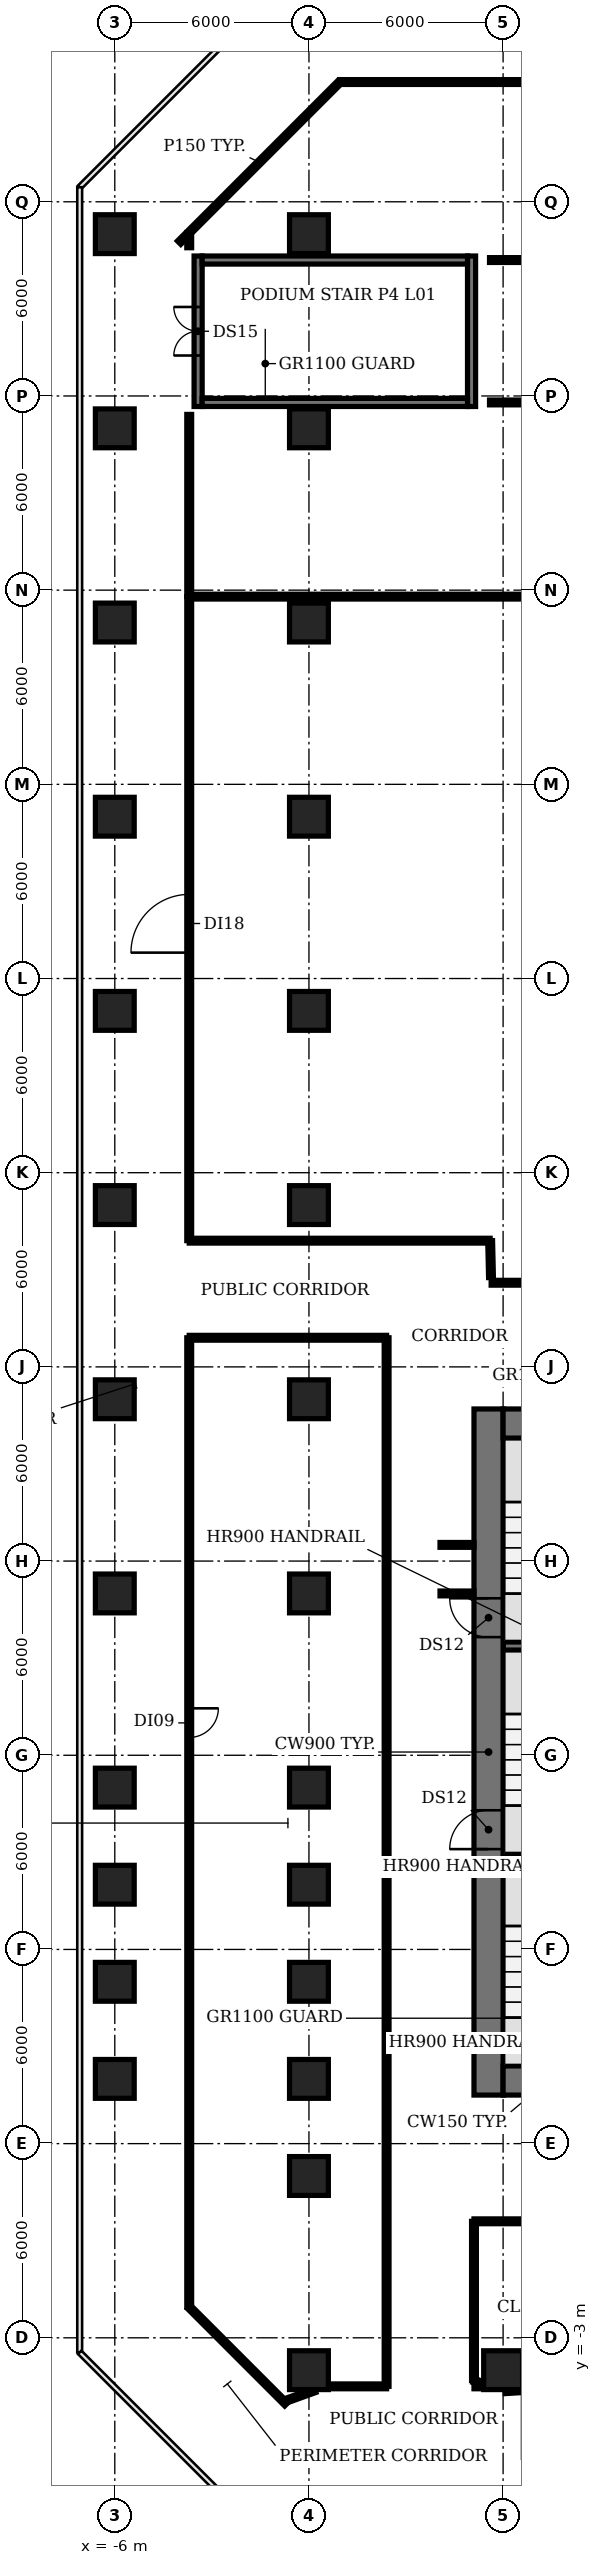
"""IFC4 building model, lengths in metres.
Left out: names, types, materials, properties, quantities, classifications, styles, units other than length and angle.
Written with IfcOpenShell. Run it as: python <this file> out.ifc"""

import sys

from ifc_helpers import new_model, si_unit, direction, frame, frame_2d, origin, origin_2d, place, context, subcontext, project, spatial, rectangle, extrude, element, fill, save


model = new_model("IFC4")
c1 = context("Model", 3, precision=1e-05, world=origin(), true_north=direction((0.0, 1.0)))
c2 = subcontext(c1, "Body", "Model", "MODEL_VIEW")
j1 = project(units=[si_unit("LENGTHUNIT", "METRE"), si_unit("PLANEANGLEUNIT", "RADIAN")], contexts=[c1])
p1 = place(None, origin())
s1 = spatial("IfcSite", under=j1, at=p1, CompositionType="ELEMENT")
p2 = place(p1, origin())
s2 = spatial("IfcBuilding", under=s1, at=p2, CompositionType="ELEMENT")
p3 = place(p2, frame((0.0, 0.0, 6.0)))
s3 = spatial("IfcBuildingStorey", under=s2, at=p3, CompositionType="ELEMENT", Elevation=6.0)
for number, where, z_axis, x_axis in (
    (1, (-6.0, 5.0, 0.0), (0.0, 0.0, 1.0), (1.0, 0.0, 0.0)),
    (2, (-6.0, 8.0, 0.0), (0.0, 0.0, 1.0), (1.0, 0.0, 0.0)),
    (3, (-6.0, 11.0, 0.0), (0.0, 0.0, 1.0), (1.0, 0.0, 0.0)),
    (4, (-6.0, 14.0, 0.0), (0.0, 0.0, 1.0), (1.0, 0.0, 0.0)),
    (5, (-6.0, 20.0, 0.0), (0.0, 0.0, 1.0), (1.0, 0.0, 0.0)),
    (6, (-6.0, 26.0, 0.0), (0.0, 0.0, 1.0), (1.0, 0.0, 0.0)),
    (7, (-6.0, 32.0, 0.0), (0.0, 0.0, 1.0), (1.0, 0.0, 0.0)),
    (8, (-6.0, 38.0, 0.0), (0.0, 0.0, 1.0), (1.0, 0.0, 0.0)),
    (9, (-6.0, 44.0, 0.0), (0.0, 0.0, 1.0), (1.0, 0.0, 0.0)),
    (10, (-6.0, 50.0, 0.0), (0.0, 0.0, 1.0), (1.0, 0.0, 0.0)),
    (11, (-6.0, 56.0, 0.0), (0.0, 0.0, 1.0), (1.0, 0.0, 0.0)),
    (12, (-6.0, 62.0, 0.0), (0.0, 0.0, 1.0), (1.0, 0.0, 0.0)),
    (13, (0.0, -4.0, 0.0), (0.0, 0.0, 1.0), (1.0, 0.0, 0.0)),
    (14, (0.0, 2.0, 0.0), (0.0, 0.0, 1.0), (1.0, 0.0, 0.0)),
    (15, (0.0, 5.0, 0.0), (0.0, 0.0, 1.0), (1.0, 0.0, 0.0)),
    (16, (0.0, 8.0, 0.0), (0.0, 0.0, 1.0), (1.0, 0.0, 0.0)),
    (17, (0.0, 11.0, 0.0), (0.0, 0.0, 1.0), (1.0, 0.0, 0.0)),
    (18, (0.0, 14.0, 0.0), (0.0, 0.0, 1.0), (1.0, 0.0, 0.0)),
    (19, (0.0, 20.0, 0.0), (0.0, 0.0, 1.0), (1.0, 0.0, 0.0)),
    (20, (0.0, 26.0, 0.0), (0.0, 0.0, 1.0), (1.0, 0.0, 0.0)),
    (21, (0.0, 32.0, 0.0), (0.0, 0.0, 1.0), (1.0, 0.0, 0.0)),
    (22, (0.0, 38.0, 0.0), (0.0, 0.0, 1.0), (1.0, 0.0, 0.0)),
    (23, (0.0, 44.0, 0.0), (0.0, 0.0, 1.0), (1.0, 0.0, 0.0)),
    (24, (0.0, 50.0, 0.0), (0.0, 0.0, 1.0), (1.0, 0.0, 0.0)),
    (25, (0.0, 56.0, 0.0), (0.0, 0.0, 1.0), (1.0, 0.0, 0.0)),
    (26, (0.0, 62.0, 0.0), (0.0, 0.0, 1.0), (1.0, 0.0, 0.0)),
    (27, (6.0, -4.0, 0.0), (0.0, 0.0, 1.0), (1.0, 0.0, 0.0)),
):
    element("IfcColumn", number, at=place(p3, frame(where, z_axis=z_axis, x_axis=x_axis)), inside=s3, PredefinedType="COLUMN", context=c2, shape_type="SweptSolid", body=[
        extrude(rectangle(XDim=1.2, YDim=1.2, at=origin_2d()), origin(), (0.0, 0.0, 1.0), 4.6),
    ])
for number, where, z_axis, x_axis in (
    (28, (6.0, 11.825, 0.0), (0.0, 0.0, 1.0), (1.0, 0.0, 0.0)),
    (29, (6.0, 18.375, 0.0), (0.0, 0.0, 1.0), (1.0, 0.0, 0.0)),
):
    element("IfcWall", number, at=place(p3, frame(where, z_axis=z_axis, x_axis=x_axis)), inside=s3, PredefinedType="SHEAR", context=c2, shape_type="SweptSolid", body=[
        extrude(rectangle(XDim=3.15, YDim=0.25, at=frame_2d((1.575, 0.0))), origin(), (0.0, 0.0, 1.0), 4.6),
    ])
p4 = place(p3, frame((5.55, 4.5, 0.0), z_axis=(0.0, 0.0, 1.0), x_axis=(0.0, 1.0, 0.0)))
e30 = element("IfcWall", 30, at=p4, inside=s3, PredefinedType="SHEAR", context=c2, shape_type="SweptSolid", body=[
    extrude(rectangle(XDim=21.2, YDim=0.9, at=frame_2d((10.6, 0.0))), origin(), (0.0, 0.0, 1.0), 4.6),
])
p5 = place(p4, frame((7.6, 0.0, 0.0)))
e31 = element("IfcOpeningElement", 31, at=p5, cuts=e30, PredefinedType="OPENING", context=c2, shape_type="SweptSolid", body=[
    extrude(rectangle(XDim=1.2, YDim=2.1, at=frame_2d((0.6, 1.05))), frame((0.0, 0.46, 0.0), z_axis=(0.0, -1.0, 0.0), x_axis=(1.0, 0.0, 0.0)), (0.0, 0.0, 1.0), 0.92),
])
p6 = place(p4, frame((14.15, 0.0, 0.0)))
e32 = element("IfcOpeningElement", 32, at=p6, cuts=e30, PredefinedType="OPENING", context=c2, shape_type="SweptSolid", body=[
    extrude(rectangle(XDim=1.2, YDim=2.1, at=frame_2d((0.6, 1.05))), frame((0.0, 0.46, 0.0), z_axis=(0.0, -1.0, 0.0), x_axis=(1.0, 0.0, 0.0)), (0.0, 0.0, 1.0), 0.92),
])
p7 = place(p3, frame((24.0, 4.95, 0.0), z_axis=(0.0, 0.0, 1.0), x_axis=(-1.0, 0.0, 0.0)))
e33 = element("IfcWall", 33, at=p7, inside=s3, PredefinedType="SHEAR", context=c2, shape_type="SweptSolid", body=[
    extrude(rectangle(XDim=18.0, YDim=0.9, at=frame_2d((9.0, 0.0))), origin(), (0.0, 0.0, 1.0), 4.6),
])
p8 = place(p7, frame((15.675, 0.0, 0.0)))
e34 = element("IfcOpeningElement", 34, at=p8, cuts=e33, PredefinedType="OPENING", context=c2, shape_type="SweptSolid", body=[
    extrude(rectangle(XDim=1.5, YDim=2.1, at=frame_2d((0.75, 1.05))), frame((0.0, 0.46, 0.0), z_axis=(0.0, -1.0, 0.0), x_axis=(1.0, 0.0, 0.0)), (0.0, 0.0, 1.0), 0.92),
])
p9 = place(p7, frame((0.825, 0.0, 0.0)))
e35 = element("IfcOpeningElement", 35, at=p9, cuts=e33, PredefinedType="OPENING", context=c2, shape_type="SweptSolid", body=[
    extrude(rectangle(XDim=1.5, YDim=2.1, at=frame_2d((0.75, 1.05))), frame((0.0, 0.46, 0.0), z_axis=(0.0, -1.0, 0.0), x_axis=(1.0, 0.0, 0.0)), (0.0, 0.0, 1.0), 0.92),
])
p10 = place(p7, frame((13.0, 0.0, 0.0)))
e36 = element("IfcOpeningElement", 36, at=p10, cuts=e33, PredefinedType="OPENING", context=c2, shape_type="SweptSolid", body=[
    extrude(rectangle(XDim=1.2, YDim=2.1, at=frame_2d((0.6, 1.05))), frame((0.0, 0.46, 0.0), z_axis=(0.0, -1.0, 0.0), x_axis=(1.0, 0.0, 0.0)), (0.0, 0.0, 1.0), 0.92),
])
p11 = place(p7, frame((4.9, 0.0, 0.0)))
e37 = element("IfcOpeningElement", 37, at=p11, cuts=e33, PredefinedType="OPENING", context=c2, shape_type="SweptSolid", body=[
    extrude(rectangle(XDim=1.0, YDim=2.1, at=frame_2d((0.5, 1.05))), frame((0.0, 0.46, 0.0), z_axis=(0.0, -1.0, 0.0), x_axis=(1.0, 0.0, 0.0)), (0.0, 0.0, 1.0), 0.92),
])
p12 = place(p3, frame((6.0, 25.25, 0.0), z_axis=(0.0, 0.0, 1.0), x_axis=(1.0, 0.0, 0.0)))
e38 = element("IfcWall", 38, at=p12, inside=s3, PredefinedType="SHEAR", context=c2, shape_type="SweptSolid", body=[
    extrude(rectangle(XDim=18.0, YDim=0.9, at=frame_2d((9.0, 0.0))), origin(), (0.0, 0.0, 1.0), 4.6),
])
p13 = place(p3, frame((-3.425, 56.675, 0.0), z_axis=(0.0, 0.0, 1.0), x_axis=(0.0, 1.0, 0.0)))
e39 = element("IfcWall", 39, at=p13, inside=s3, PredefinedType="SHEAR", context=c2, shape_type="SweptSolid", body=[
    extrude(rectangle(XDim=4.65, YDim=0.25, at=frame_2d((2.325, 0.0))), origin(), (0.0, 0.0, 1.0), 4.6),
])
p14 = place(p13, frame((1.575, 0.0, 0.0)))
e40 = element("IfcOpeningElement", 40, at=p14, cuts=e39, PredefinedType="OPENING", context=c2, shape_type="SweptSolid", body=[
    extrude(rectangle(XDim=1.5, YDim=2.1, at=frame_2d((0.75, 1.05))), frame((0.0, 0.135, 0.0), z_axis=(0.0, -1.0, 0.0), x_axis=(1.0, 0.0, 0.0)), (0.0, 0.0, 1.0), 0.27),
])
p15 = place(p3, frame((5.025, 56.675, 0.0), z_axis=(0.0, 0.0, 1.0), x_axis=(0.0, 1.0, 0.0)))
e41 = element("IfcWall", 41, at=p15, inside=s3, PredefinedType="SHEAR", context=c2, shape_type="SweptSolid", body=[
    extrude(rectangle(XDim=4.65, YDim=0.25, at=frame_2d((2.325, 0.0))), origin(), (0.0, 0.0, 1.0), 4.6),
])
for number, where, z_axis, x_axis in (
    (42, (-3.3, 56.8, 0.0), (0.0, 0.0, 1.0), (1.0, 0.0, 0.0)),
    (43, (-3.3, 61.2, 0.0), (0.0, 0.0, 1.0), (1.0, 0.0, 0.0)),
):
    element("IfcWall", number, at=place(p3, frame(where, z_axis=z_axis, x_axis=x_axis)), inside=s3, PredefinedType="SHEAR", context=c2, shape_type="SweptSolid", body=[
        extrude(rectangle(XDim=8.2, YDim=0.25, at=frame_2d((4.1, 0.0))), origin(), (0.0, 0.0, 1.0), 4.6),
    ])
p16 = place(p3, frame((-4.013, 61.737, 0.0), z_axis=(0.0, 0.0, 1.0), x_axis=(0.707106781187, 0.707106781187, 0.0)))
e44 = element("IfcWall", 44, at=p16, inside=s3, PredefinedType="PARTITIONING", context=c2, shape_type="SweptSolid", body=[
    extrude(rectangle(XDim=7.019, YDim=0.15, at=frame_2d((3.51, 0.0))), origin(), (0.0, 0.0, 1.0), 3.18),
])
p17 = place(p3, frame((-3.7, -2.05, 0.0), z_axis=(0.0, 0.0, 1.0), x_axis=(0.707106781187, -0.707106781187, 0.0)))
e45 = element("IfcWall", 45, at=p17, inside=s3, PredefinedType="PARTITIONING", context=c2, shape_type="SweptSolid", body=[
    extrude(rectangle(XDim=4.249, YDim=0.15, at=frame_2d((2.125, 0.0))), origin(), (0.0, 0.0, 1.0), 3.18),
])
p18 = place(p3, frame((-3.7, 27.9, 0.0), z_axis=(0.0, 0.0, 1.0), x_axis=(0.0, -1.0, 0.0)))
e46 = element("IfcWall", 46, at=p18, inside=s3, PredefinedType="PARTITIONING", context=c2, shape_type="SweptSolid", body=[
    extrude(rectangle(XDim=29.95, YDim=0.15, at=frame_2d((14.975, 0.0))), origin(), (0.0, 0.0, 1.0), 3.18),
])
p19 = place(p18, frame((11.45, 0.0, 0.0)))
e47 = element("IfcOpeningElement", 47, at=p19, cuts=e46, PredefinedType="OPENING", context=c2, shape_type="SweptSolid", body=[
    extrude(rectangle(XDim=0.9, YDim=2.1, at=frame_2d((0.45, 1.05))), frame((0.0, 0.085, 0.0), z_axis=(0.0, -1.0, 0.0), x_axis=(1.0, 0.0, 0.0)), (0.0, 0.0, 1.0), 0.17),
])
p20 = place(p3, frame((-3.7, 27.9, 0.0), z_axis=(0.0, 0.0, 1.0), x_axis=(1.0, 0.0, 0.0)))
e48 = element("IfcWall", 48, at=p20, inside=s3, PredefinedType="PARTITIONING", context=c2, shape_type="SweptSolid", body=[
    extrude(rectangle(XDim=6.1, YDim=0.15, at=frame_2d((3.05, 0.0))), origin(), (0.0, 0.0, 1.0), 3.18),
])
p21 = place(p3, frame((-3.7, 30.9, 0.0), z_axis=(0.0, 0.0, 1.0), x_axis=(0.0, 1.0, 0.0)))
e49 = element("IfcWall", 49, at=p21, inside=s3, PredefinedType="PARTITIONING", context=c2, shape_type="SweptSolid", body=[
    extrude(rectangle(XDim=19.9, YDim=0.15, at=frame_2d((9.95, 0.0))), origin(), (0.0, 0.0, 1.0), 3.18),
])
p22 = place(p21, frame((8.9, 0.0, 0.0)))
e50 = element("IfcOpeningElement", 50, at=p22, cuts=e49, PredefinedType="OPENING", context=c2, shape_type="SweptSolid", body=[
    extrude(rectangle(XDim=1.8, YDim=2.1, at=frame_2d((0.9, 1.05))), frame((0.0, 0.085, 0.0), z_axis=(0.0, -1.0, 0.0), x_axis=(1.0, 0.0, 0.0)), (0.0, 0.0, 1.0), 0.17),
])
p23 = place(p3, frame((-3.7, 30.9, 0.0), z_axis=(0.0, 0.0, 1.0), x_axis=(1.0, 0.0, 0.0)))
e51 = element("IfcWall", 51, at=p23, inside=s3, PredefinedType="PARTITIONING", context=c2, shape_type="SweptSolid", body=[
    extrude(rectangle(XDim=9.3, YDim=0.15, at=frame_2d((4.65, 0.0))), origin(), (0.0, 0.0, 1.0), 3.18),
])
p24 = place(p3, frame((-3.7, 50.8, 0.0), z_axis=(0.0, 0.0, 1.0), x_axis=(0.0, 1.0, 0.0)))
e52 = element("IfcWall", 52, at=p24, inside=s3, PredefinedType="PARTITIONING", context=c2, shape_type="SweptSolid", body=[
    extrude(rectangle(XDim=5.63, YDim=0.15, at=frame_2d((2.815, 0.0))), origin(), (0.0, 0.0, 1.0), 3.18),
])
p25 = place(p3, frame((-3.7, 50.8, 0.0), z_axis=(0.0, 0.0, 1.0), x_axis=(1.0, 0.0, 0.0)))
e53 = element("IfcWall", 53, at=p25, inside=s3, PredefinedType="PARTITIONING", context=c2, shape_type="SweptSolid", body=[
    extrude(rectangle(XDim=32.2, YDim=0.15, at=frame_2d((16.1, 0.0))), origin(), (0.0, 0.0, 1.0), 3.18),
])
p26 = place(p3, frame((-3.7, 61.58, 0.0), z_axis=(0.0, 0.0, 1.0), x_axis=(0.0, 1.0, 0.0)))
e54 = element("IfcWall", 54, at=p26, inside=s3, PredefinedType="PARTITIONING", context=c2, shape_type="SweptSolid", body=[
    extrude(rectangle(XDim=0.47, YDim=0.15, at=frame_2d((0.235, 0.0))), origin(), (0.0, 0.0, 1.0), 3.18),
])
p27 = place(p3, frame((-0.78, -4.97, 0.0), z_axis=(0.0, 0.0, 1.0), x_axis=(0.940681994894, 0.339289528991, 0.0)))
e55 = element("IfcWall", 55, at=p27, inside=s3, PredefinedType="PARTITIONING", context=c2, shape_type="SweptSolid", body=[
    extrude(rectangle(XDim=1.031, YDim=0.15, at=frame_2d((0.516, 0.0))), origin(), (0.0, 0.0, 1.0), 3.18),
])
p28 = place(p3, frame((0.46, -4.5, 0.0), z_axis=(0.0, 0.0, 1.0), x_axis=(1.0, 0.0, 0.0)))
e56 = element("IfcWall", 56, at=p28, inside=s3, PredefinedType="PARTITIONING", context=c2, shape_type="SweptSolid", body=[
    extrude(rectangle(XDim=1.94, YDim=0.15, at=frame_2d((0.97, 0.0))), origin(), (0.0, 0.0, 1.0), 3.18),
])
p29 = place(p3, frame((2.4, -4.5, 0.0), z_axis=(0.0, 0.0, 1.0), x_axis=(0.0, 1.0, 0.0)))
e57 = element("IfcWall", 57, at=p29, inside=s3, PredefinedType="PARTITIONING", context=c2, shape_type="SweptSolid", body=[
    extrude(rectangle(XDim=32.4, YDim=0.15, at=frame_2d((16.2, 0.0))), origin(), (0.0, 0.0, 1.0), 3.18),
])
for number, where, z_axis, x_axis in (
    (58, (4.05, 20.0, 0.0), (0.0, 0.0, 1.0), (1.0, 0.0, 0.0)),
    (59, (4.05, 21.5, 0.0), (0.0, 0.0, 1.0), (1.0, 0.0, 0.0)),
):
    element("IfcWall", number, at=place(p3, frame(where, z_axis=z_axis, x_axis=x_axis)), inside=s3, PredefinedType="PARTITIONING", context=c2, shape_type="SweptSolid", body=[
        extrude(rectangle(XDim=1.05, YDim=0.15, at=frame_2d((0.525, 0.0))), origin(), (0.0, 0.0, 1.0), 3.18),
    ])
p30 = place(p3, frame((5.1, -4.5, 0.0), z_axis=(0.0, 0.0, 1.0), x_axis=(1.0, 0.0, 0.0)))
e60 = element("IfcWall", 60, at=p30, inside=s3, PredefinedType="PARTITIONING", context=c2, shape_type="SweptSolid", body=[
    extrude(rectangle(XDim=0.44, YDim=0.15, at=frame_2d((0.22, 0.0))), origin(), (0.0, 0.0, 1.0), 3.18),
])
p31 = place(p3, frame((5.1, -4.32, 0.0), z_axis=(0.0, 0.0, 1.0), x_axis=(0.0, 1.0, 0.0)))
e61 = element("IfcWall", 61, at=p31, inside=s3, PredefinedType="PARTITIONING", context=c2, shape_type="SweptSolid", body=[
    extrude(rectangle(XDim=4.92, YDim=0.15, at=frame_2d((2.46, 0.0))), origin(), (0.0, 0.0, 1.0), 3.18),
])
p32 = place(p3, frame((5.1, -4.32, 0.0), z_axis=(0.0, 0.0, 1.0), x_axis=(0.925579680267, -0.378552843705, 0.0)))
e62 = element("IfcWall", 62, at=p32, inside=s3, PredefinedType="PARTITIONING", context=c2, shape_type="SweptSolid", body=[
    extrude(rectangle(XDim=0.475, YDim=0.15, at=frame_2d((0.238, 0.0))), origin(), (0.0, 0.0, 1.0), 3.18),
])
for number, where, z_axis, x_axis in (
    (63, (5.58, 56.8, 0.0), (0.0, 0.0, 1.0), (1.0, 0.0, 0.0)),
    (64, (5.58, 61.2, 0.0), (0.0, 0.0, 1.0), (1.0, 0.0, 0.0)),
):
    element("IfcWall", number, at=place(p3, frame(where, z_axis=z_axis, x_axis=x_axis)), inside=s3, PredefinedType="PARTITIONING", context=c2, shape_type="SweptSolid", body=[
        extrude(rectangle(XDim=22.92, YDim=0.15, at=frame_2d((11.46, 0.0))), origin(), (0.0, 0.0, 1.0), 3.18),
    ])
p33 = place(p3, frame((5.6, 30.9, 0.0), z_axis=(0.0, 0.0, 1.0), x_axis=(0.022906193834, -0.99973761872, 0.0)))
e65 = element("IfcWall", 65, at=p33, inside=s3, PredefinedType="PARTITIONING", context=c2, shape_type="SweptSolid", body=[
    extrude(rectangle(XDim=1.14, YDim=0.15, at=frame_2d((0.57, 0.0))), origin(), (0.0, 0.0, 1.0), 3.18),
])
p34 = place(p3, frame((5.63, 29.6, 0.0), z_axis=(0.0, 0.0, 1.0), x_axis=(1.0, 0.0, 0.0)))
e66 = element("IfcWall", 66, at=p34, inside=s3, PredefinedType="PARTITIONING", context=c2, shape_type="SweptSolid", body=[
    extrude(rectangle(XDim=18.74, YDim=0.15, at=frame_2d((9.37, 0.0))), origin(), (0.0, 0.0, 1.0), 3.18),
])
p35 = place(p3, frame((6.06, -4.65, 0.0), z_axis=(0.0, 0.0, 1.0), x_axis=(0.998071793058, 0.062070088618, 0.0)))
e67 = element("IfcWall", 67, at=p35, inside=s3, PredefinedType="PARTITIONING", context=c2, shape_type="SweptSolid", body=[
    extrude(rectangle(XDim=0.641, YDim=0.15, at=frame_2d((0.321, 0.0))), origin(), (0.0, 0.0, 1.0), 3.18),
])
p36 = place(p3, frame((17.5, 0.6, 0.0), z_axis=(0.0, 0.0, 1.0), x_axis=(-1.0, 0.0, 0.0)))
e68 = element("IfcWall", 68, at=p36, inside=s3, PredefinedType="PARTITIONING", context=c2, shape_type="SweptSolid", body=[
    extrude(rectangle(XDim=12.4, YDim=0.15, at=frame_2d((6.2, 0.0))), origin(), (0.0, 0.0, 1.0), 3.18),
])
p37 = place(p36, frame((5.6, 0.0, 0.0)))
e69 = element("IfcOpeningElement", 69, at=p37, cuts=e68, PredefinedType="OPENING", context=c2, shape_type="SweptSolid", body=[
    extrude(rectangle(XDim=0.9, YDim=2.1, at=frame_2d((0.45, 1.05))), frame((0.0, 0.085, 0.0), z_axis=(0.0, -1.0, 0.0), x_axis=(1.0, 0.0, 0.0)), (0.0, 0.0, 1.0), 0.17),
])
p38 = place(p3, frame((28.5, 66.7, 0.0), z_axis=(0.0, 0.0, 1.0), x_axis=(-1.0, 0.0, 0.0)))
e70 = element("IfcWall", 70, at=p38, inside=s3, PredefinedType="PARTITIONING", context=c2, shape_type="SweptSolid", body=[
    extrude(rectangle(XDim=27.55, YDim=0.15, at=frame_2d((13.775, 0.0))), origin(), (0.0, 0.0, 1.0), 3.18),
])
p39 = place(p38, frame((13.15, 0.0, 0.0)))
e71 = element("IfcOpeningElement", 71, at=p39, cuts=e70, PredefinedType="OPENING", context=c2, shape_type="SweptSolid", body=[
    extrude(rectangle(XDim=1.0, YDim=2.1, at=frame_2d((0.5, 1.05))), frame((0.0, 0.085, 0.0), z_axis=(0.0, -1.0, 0.0), x_axis=(1.0, 0.0, 0.0)), (0.0, 0.0, 1.0), 0.17),
])
p40 = place(p5, origin())
e72 = element("IfcDoor", 72, at=p40, inside=s3, OperationType="SINGLE_SWING_LEFT", PredefinedType="DOOR", context=c2, shape_type="SweptSolid", body=[
    extrude(rectangle(XDim=1.2, YDim=2.1, at=frame_2d((0.6, 1.05))), frame((0.0, 0.025, 0.0), z_axis=(0.0, -1.0, 0.0), x_axis=(1.0, 0.0, 0.0)), (0.0, 0.0, 1.0), 0.05),
])
fill(e31, e72)
p41 = place(p6, origin())
e73 = element("IfcDoor", 73, at=p41, inside=s3, OperationType="SINGLE_SWING_RIGHT", PredefinedType="DOOR", context=c2, shape_type="SweptSolid", body=[
    extrude(rectangle(XDim=1.2, YDim=2.1, at=frame_2d((0.6, 1.05))), frame((0.0, 0.025, 0.0), z_axis=(0.0, -1.0, 0.0), x_axis=(1.0, 0.0, 0.0)), (0.0, 0.0, 1.0), 0.05),
])
fill(e32, e73)
p42 = place(p14, origin())
e74 = element("IfcDoor", 74, at=p42, inside=s3, OperationType="DOUBLE_DOOR_SINGLE_SWING", PredefinedType="DOOR", context=c2, shape_type="SweptSolid", body=[
    extrude(rectangle(XDim=1.5, YDim=2.1, at=frame_2d((0.75, 1.05))), frame((0.0, 0.025, 0.0), z_axis=(0.0, -1.0, 0.0), x_axis=(1.0, 0.0, 0.0)), (0.0, 0.0, 1.0), 0.05),
])
fill(e40, e74)
p43 = place(p19, origin())
e75 = element("IfcDoor", 75, at=p43, inside=s3, OperationType="SINGLE_SWING_LEFT", PredefinedType="DOOR", context=c2, shape_type="SweptSolid", body=[
    extrude(rectangle(XDim=0.9, YDim=2.1, at=frame_2d((0.45, 1.05))), frame((0.0, 0.025, 0.0), z_axis=(0.0, -1.0, 0.0), x_axis=(1.0, 0.0, 0.0)), (0.0, 0.0, 1.0), 0.05),
])
fill(e47, e75)
p44 = place(p22, origin())
e76 = element("IfcDoor", 76, at=p44, inside=s3, OperationType="SINGLE_SWING_LEFT", PredefinedType="DOOR", context=c2, shape_type="SweptSolid", body=[
    extrude(rectangle(XDim=1.8, YDim=2.1, at=frame_2d((0.9, 1.05))), frame((0.0, 0.025, 0.0), z_axis=(0.0, -1.0, 0.0), x_axis=(1.0, 0.0, 0.0)), (0.0, 0.0, 1.0), 0.05),
])
fill(e50, e76)
save(model, sys.argv[1])
